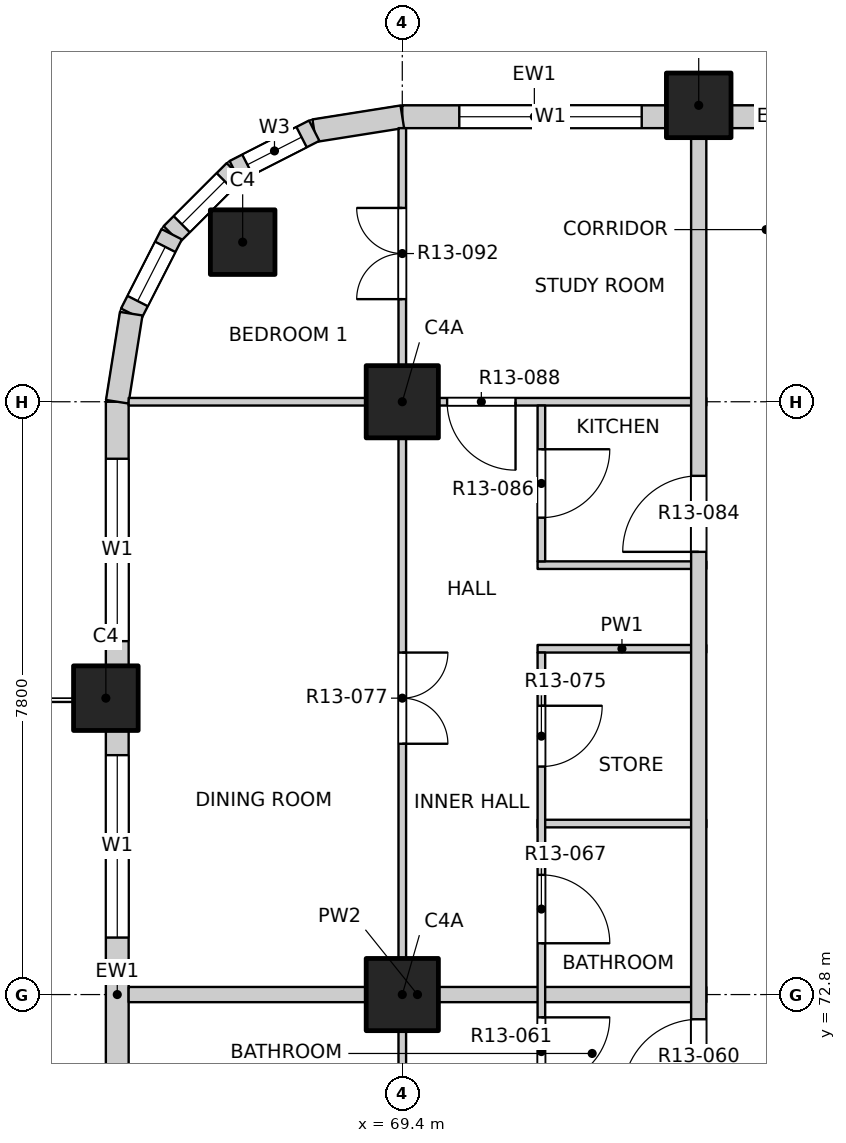
"""IFC4 building model, lengths in metres.
Left out: names, types, materials, properties, quantities, classifications, styles, units other than length and angle.
Written with IfcOpenShell. Run it as: python <this file> out.ifc"""

import sys

from ifc_helpers import new_model, si_unit, direction, frame, frame_2d, origin, origin_2d, place, context, subcontext, project, spatial, rectangle, extrude, element, fill, save


model = new_model("IFC4")
c1 = context("Model", 3, precision=1e-05, world=origin(), true_north=direction((0.0, 1.0)))
c2 = subcontext(c1, "Body", "Model", "MODEL_VIEW")
j1 = project(units=[si_unit("LENGTHUNIT", "METRE"), si_unit("PLANEANGLEUNIT", "RADIAN")], contexts=[c1])
p1 = place(None, origin())
s1 = spatial("IfcSite", under=j1, at=p1, CompositionType="ELEMENT")
p2 = place(p1, origin())
s2 = spatial("IfcBuilding", under=s1, at=p2, CompositionType="ELEMENT")
p3 = place(p2, frame((0.0, 0.0, 140.7)))
s3 = spatial("IfcBuildingStorey", under=s2, at=p3, CompositionType="ELEMENT", Elevation=140.7)
for number, where, z_axis, x_axis in (
    (1, (67.3, 82.7, -0.25), (0.0, 0.0, 1.0), (1.0, 0.0, 0.0)),
    (2, (73.3, 84.5, -0.25), (0.0, 0.0, 1.0), (1.0, 0.0, 0.0)),
    (3, (65.5, 76.7, -0.25), (0.0, 0.0, 1.0), (1.0, 0.0, 0.0)),
):
    element("IfcColumn", number, at=place(p3, frame(where, z_axis=z_axis, x_axis=x_axis)), inside=s3, PredefinedType="COLUMN", context=c2, shape_type="SweptSolid", body=[
        extrude(rectangle(XDim=0.85, YDim=0.85, at=origin_2d()), origin(), (0.0, 0.0, 1.0), 3.35),
    ])
for number, where, z_axis, x_axis in (
    (4, (69.4, 72.8, -0.25), (0.0, 0.0, 1.0), (1.0, 0.0, 0.0)),
    (5, (69.4, 80.6, -0.25), (0.0, 0.0, 1.0), (1.0, 0.0, 0.0)),
):
    element("IfcColumn", number, at=place(p3, frame(where, z_axis=z_axis, x_axis=x_axis)), inside=s3, PredefinedType="COLUMN", context=c2, shape_type="SweptSolid", body=[
        extrude(rectangle(XDim=0.95, YDim=0.95, at=origin_2d()), origin(), (0.0, 0.0, 1.0), 3.35),
    ])
p4 = place(p3, frame((69.4, 84.35, 0.0), z_axis=(0.0, 0.0, 1.0), x_axis=(1.0, 0.0, 0.0)))
e6 = element("IfcWall", 6, at=p4, inside=s3, PredefinedType="SOLIDWALL", context=c2, shape_type="SweptSolid", body=[
    extrude(rectangle(XDim=3.475, YDim=0.3, at=frame_2d((1.738, 0.0))), origin(), (0.0, 0.0, 1.0), 3.1),
])
p5 = place(p4, frame((0.75, 0.0, 0.9)))
e7 = element("IfcOpeningElement", 7, at=p5, cuts=e6, PredefinedType="OPENING", context=c2, shape_type="SweptSolid", body=[
    extrude(rectangle(XDim=2.4, YDim=1.8, at=frame_2d((1.2, 0.9))), frame((0.0, 0.16, 0.0), z_axis=(0.0, -1.0, 0.0), x_axis=(1.0, 0.0, 0.0)), (0.0, 0.0, 1.0), 0.32),
])
p6 = place(p3, frame((73.725, 84.35, 0.0), z_axis=(0.0, 0.0, 1.0), x_axis=(1.0, 0.0, 0.0)))
e8 = element("IfcWall", 8, at=p6, inside=s3, PredefinedType="SOLIDWALL", context=c2, shape_type="SweptSolid", body=[
    extrude(rectangle(XDim=1.25, YDim=0.3, at=frame_2d((0.625, 0.0))), origin(), (0.0, 0.0, 1.0), 3.1),
])
p7 = place(p3, frame((65.65, 69.325, 0.0), z_axis=(0.0, 0.0, 1.0), x_axis=(0.0, 1.0, 0.0)))
e9 = element("IfcWall", 9, at=p7, inside=s3, PredefinedType="SOLIDWALL", context=c2, shape_type="SweptSolid", body=[
    extrude(rectangle(XDim=6.95, YDim=0.3, at=frame_2d((3.475, 0.0))), origin(), (0.0, 0.0, 1.0), 3.1),
])
p8 = place(p7, frame((0.625, 0.0, 0.0)))
e10 = element("IfcOpeningElement", 10, at=p8, cuts=e9, PredefinedType="OPENING", context=c2, shape_type="SweptSolid", body=[
    extrude(rectangle(XDim=1.8, YDim=2.4, at=frame_2d((0.9, 1.2))), frame((0.0, 0.16, 0.0), z_axis=(0.0, -1.0, 0.0), x_axis=(1.0, 0.0, 0.0)), (0.0, 0.0, 1.0), 0.32),
])
p9 = place(p7, frame((4.225, 0.0, 0.9)))
e11 = element("IfcOpeningElement", 11, at=p9, cuts=e9, PredefinedType="OPENING", context=c2, shape_type="SweptSolid", body=[
    extrude(rectangle(XDim=2.4, YDim=1.8, at=frame_2d((1.2, 0.9))), frame((0.0, 0.16, 0.0), z_axis=(0.0, -1.0, 0.0), x_axis=(1.0, 0.0, 0.0)), (0.0, 0.0, 1.0), 0.32),
])
p10 = place(p3, frame((65.65, 77.125, 0.0), z_axis=(0.0, 0.0, 1.0), x_axis=(0.0, 1.0, 0.0)))
e12 = element("IfcWall", 12, at=p10, inside=s3, PredefinedType="SOLIDWALL", context=c2, shape_type="SweptSolid", body=[
    extrude(rectangle(XDim=3.475, YDim=0.3, at=frame_2d((1.738, 0.0))), origin(), (0.0, 0.0, 1.0), 3.1),
])
p11 = place(p10, frame((0.325, 0.0, 0.9)))
e13 = element("IfcOpeningElement", 13, at=p11, cuts=e12, PredefinedType="OPENING", context=c2, shape_type="SweptSolid", body=[
    extrude(rectangle(XDim=2.4, YDim=1.8, at=frame_2d((1.2, 0.9))), frame((0.0, 0.16, 0.0), z_axis=(0.0, -1.0, 0.0), x_axis=(1.0, 0.0, 0.0)), (0.0, 0.0, 1.0), 0.32),
])
p12 = place(p3, frame((69.4, 84.35, 0.0), z_axis=(0.0, 0.0, 1.0), x_axis=(-0.987678452879, -0.156496880861, 0.0)))
e14 = element("IfcWall", 14, at=p12, inside=s3, PredefinedType="SOLIDWALL", context=c2, shape_type="SweptSolid", body=[
    extrude(rectangle(XDim=1.173, YDim=0.3, at=frame_2d((0.586, 0.0))), origin(), (0.0, 0.0, 1.0), 3.1),
])
p13 = place(p3, frame((68.241, 84.167, 0.0), z_axis=(0.0, 0.0, 1.0), x_axis=(-0.890988677504, -0.454025524128, 0.0)))
e15 = element("IfcWall", 15, at=p13, inside=s3, PredefinedType="SOLIDWALL", context=c2, shape_type="SweptSolid", body=[
    extrude(rectangle(XDim=1.173, YDim=0.3, at=frame_2d((0.587, 0.0))), origin(), (0.0, 0.0, 1.0), 3.1),
])
p14 = place(p13, frame((0.187, 0.0, 0.9)))
e16 = element("IfcOpeningElement", 16, at=p14, cuts=e15, PredefinedType="OPENING", context=c2, shape_type="SweptSolid", body=[
    extrude(rectangle(XDim=0.8, YDim=1.2, at=frame_2d((0.4, 0.6))), frame((0.0, 0.16, 0.0), z_axis=(0.0, -1.0, 0.0), x_axis=(1.0, 0.0, 0.0)), (0.0, 0.0, 1.0), 0.32),
])
p15 = place(p3, frame((67.196, 83.634, 0.0), z_axis=(0.0, 0.0, 1.0), x_axis=(-0.707106781187, -0.707106781187, 0.0)))
e17 = element("IfcWall", 17, at=p15, inside=s3, PredefinedType="SOLIDWALL", context=c2, shape_type="SweptSolid", body=[
    extrude(rectangle(XDim=1.173, YDim=0.3, at=frame_2d((0.586, 0.0))), origin(), (0.0, 0.0, 1.0), 3.1),
])
p16 = place(p15, frame((0.187, 0.0, 0.9)))
e18 = element("IfcOpeningElement", 18, at=p16, cuts=e17, PredefinedType="OPENING", context=c2, shape_type="SweptSolid", body=[
    extrude(rectangle(XDim=0.8, YDim=1.2, at=frame_2d((0.4, 0.6))), frame((0.0, 0.16, 0.0), z_axis=(0.0, -1.0, 0.0), x_axis=(1.0, 0.0, 0.0)), (0.0, 0.0, 1.0), 0.32),
])
p17 = place(p3, frame((66.366, 82.804, 0.0), z_axis=(0.0, 0.0, 1.0), x_axis=(-0.454025524128, -0.890988677504, 0.0)))
e19 = element("IfcWall", 19, at=p17, inside=s3, PredefinedType="SOLIDWALL", context=c2, shape_type="SweptSolid", body=[
    extrude(rectangle(XDim=1.173, YDim=0.3, at=frame_2d((0.587, 0.0))), origin(), (0.0, 0.0, 1.0), 3.1),
])
p18 = place(p17, frame((0.187, 0.0, 0.9)))
e20 = element("IfcOpeningElement", 20, at=p18, cuts=e19, PredefinedType="OPENING", context=c2, shape_type="SweptSolid", body=[
    extrude(rectangle(XDim=0.8, YDim=1.2, at=frame_2d((0.4, 0.6))), frame((0.0, 0.16, 0.0), z_axis=(0.0, -1.0, 0.0), x_axis=(1.0, 0.0, 0.0)), (0.0, 0.0, 1.0), 0.32),
])
p19 = place(p3, frame((65.833, 81.759, 0.0), z_axis=(0.0, 0.0, 1.0), x_axis=(-0.156496880861, -0.987678452879, 0.0)))
e21 = element("IfcWall", 21, at=p19, inside=s3, PredefinedType="SOLIDWALL", context=c2, shape_type="SweptSolid", body=[
    extrude(rectangle(XDim=1.173, YDim=0.3, at=frame_2d((0.586, 0.0))), origin(), (0.0, 0.0, 1.0), 3.1),
])
p20 = place(p3, frame((65.8, 72.8, 0.0), z_axis=(0.0, 0.0, 1.0), x_axis=(1.0, 0.0, 0.0)))
e22 = element("IfcWall", 22, at=p20, inside=s3, PredefinedType="PARTITIONING", context=c2, shape_type="SweptSolid", body=[
    extrude(rectangle(XDim=7.6, YDim=0.2, at=frame_2d((3.8, 0.0))), origin(), (0.0, 0.0, 1.0), 3.1),
])
for number, where, z_axis, x_axis in (
    (23, (71.18, 75.05, 0.0), (0.0, 0.0, 1.0), (1.0, 0.0, 0.0)),
    (24, (71.18, 77.35, 0.0), (0.0, 0.0, 1.0), (1.0, 0.0, 0.0)),
    (25, (71.18, 78.45, 0.0), (0.0, 0.0, 1.0), (1.0, 0.0, 0.0)),
):
    element("IfcWall", number, at=place(p3, frame(where, z_axis=z_axis, x_axis=x_axis)), inside=s3, PredefinedType="PARTITIONING", context=c2, shape_type="SweptSolid", body=[
        extrude(rectangle(XDim=2.22, YDim=0.1, at=frame_2d((1.11, 0.0))), origin(), (0.0, 0.0, 1.0), 3.1),
    ])
p21 = place(p3, frame((65.8, 80.6, 0.0), z_axis=(0.0, 0.0, 1.0), x_axis=(1.0, 0.0, 0.0)))
e26 = element("IfcWall", 26, at=p21, inside=s3, PredefinedType="PARTITIONING", context=c2, shape_type="SweptSolid", body=[
    extrude(rectangle(XDim=7.6, YDim=0.1, at=frame_2d((3.8, 0.0))), origin(), (0.0, 0.0, 1.0), 3.1),
])
p22 = place(p21, frame((4.19, 0.0, 0.0)))
e27 = element("IfcOpeningElement", 27, at=p22, cuts=e26, PredefinedType="OPENING", context=c2, shape_type="SweptSolid", body=[
    extrude(rectangle(XDim=0.9, YDim=2.1, at=frame_2d((0.45, 1.05))), frame((0.0, 0.06, 0.0), z_axis=(0.0, -1.0, 0.0), x_axis=(1.0, 0.0, 0.0)), (0.0, 0.0, 1.0), 0.12),
])
p23 = place(p3, frame((69.4, 45.8, 0.0), z_axis=(0.0, 0.0, 1.0), x_axis=(0.0, 1.0, 0.0)))
e28 = element("IfcWall", 28, at=p23, inside=s3, PredefinedType="PARTITIONING", context=c2, shape_type="SweptSolid", body=[
    extrude(rectangle(XDim=38.4, YDim=0.1, at=frame_2d((19.2, 0.0))), origin(), (0.0, 0.0, 1.0), 3.1),
])
p24 = place(p23, frame((1.05, 0.0, 0.0)))
e29 = element("IfcOpeningElement", 29, at=p24, cuts=e28, PredefinedType="OPENING", context=c2, shape_type="SweptSolid", body=[
    extrude(rectangle(XDim=1.2, YDim=2.1, at=frame_2d((0.6, 1.05))), frame((0.0, 0.06, 0.0), z_axis=(0.0, -1.0, 0.0), x_axis=(1.0, 0.0, 0.0)), (0.0, 0.0, 1.0), 0.12),
])
p25 = place(p23, frame((5.1, 0.0, 0.0)))
e30 = element("IfcOpeningElement", 30, at=p25, cuts=e28, PredefinedType="OPENING", context=c2, shape_type="SweptSolid", body=[
    extrude(rectangle(XDim=0.9, YDim=2.1, at=frame_2d((0.45, 1.05))), frame((0.0, 0.06, 0.0), z_axis=(0.0, -1.0, 0.0), x_axis=(1.0, 0.0, 0.0)), (0.0, 0.0, 1.0), 0.12),
])
p26 = place(p23, frame((9.0, 0.0, 0.0)))
e31 = element("IfcOpeningElement", 31, at=p26, cuts=e28, PredefinedType="OPENING", context=c2, shape_type="SweptSolid", body=[
    extrude(rectangle(XDim=0.9, YDim=2.1, at=frame_2d((0.45, 1.05))), frame((0.0, 0.06, 0.0), z_axis=(0.0, -1.0, 0.0), x_axis=(1.0, 0.0, 0.0)), (0.0, 0.0, 1.0), 0.12),
])
p27 = place(p23, frame((12.9, 0.0, 0.0)))
e32 = element("IfcOpeningElement", 32, at=p27, cuts=e28, PredefinedType="OPENING", context=c2, shape_type="SweptSolid", body=[
    extrude(rectangle(XDim=0.9, YDim=2.1, at=frame_2d((0.45, 1.05))), frame((0.0, 0.06, 0.0), z_axis=(0.0, -1.0, 0.0), x_axis=(1.0, 0.0, 0.0)), (0.0, 0.0, 1.0), 0.12),
])
p28 = place(p23, frame((16.8, 0.0, 0.0)))
e33 = element("IfcOpeningElement", 33, at=p28, cuts=e28, PredefinedType="OPENING", context=c2, shape_type="SweptSolid", body=[
    extrude(rectangle(XDim=0.9, YDim=2.1, at=frame_2d((0.45, 1.05))), frame((0.0, 0.06, 0.0), z_axis=(0.0, -1.0, 0.0), x_axis=(1.0, 0.0, 0.0)), (0.0, 0.0, 1.0), 0.12),
])
p29 = place(p23, frame((20.7, 0.0, 0.0)))
e34 = element("IfcOpeningElement", 34, at=p29, cuts=e28, PredefinedType="OPENING", context=c2, shape_type="SweptSolid", body=[
    extrude(rectangle(XDim=0.9, YDim=2.1, at=frame_2d((0.45, 1.05))), frame((0.0, 0.06, 0.0), z_axis=(0.0, -1.0, 0.0), x_axis=(1.0, 0.0, 0.0)), (0.0, 0.0, 1.0), 0.12),
])
p30 = place(p23, frame((24.6, 0.0, 0.0)))
e35 = element("IfcOpeningElement", 35, at=p30, cuts=e28, PredefinedType="OPENING", context=c2, shape_type="SweptSolid", body=[
    extrude(rectangle(XDim=0.9, YDim=2.1, at=frame_2d((0.45, 1.05))), frame((0.0, 0.06, 0.0), z_axis=(0.0, -1.0, 0.0), x_axis=(1.0, 0.0, 0.0)), (0.0, 0.0, 1.0), 0.12),
])
p31 = place(p23, frame((30.3, 0.0, 0.0)))
e36 = element("IfcOpeningElement", 36, at=p31, cuts=e28, PredefinedType="OPENING", context=c2, shape_type="SweptSolid", body=[
    extrude(rectangle(XDim=1.2, YDim=2.1, at=frame_2d((0.6, 1.05))), frame((0.0, 0.06, 0.0), z_axis=(0.0, -1.0, 0.0), x_axis=(1.0, 0.0, 0.0)), (0.0, 0.0, 1.0), 0.12),
])
p32 = place(p23, frame((36.15, 0.0, 0.0)))
e37 = element("IfcOpeningElement", 37, at=p32, cuts=e28, PredefinedType="OPENING", context=c2, shape_type="SweptSolid", body=[
    extrude(rectangle(XDim=1.2, YDim=2.1, at=frame_2d((0.6, 1.05))), frame((0.0, 0.06, 0.0), z_axis=(0.0, -1.0, 0.0), x_axis=(1.0, 0.0, 0.0)), (0.0, 0.0, 1.0), 0.12),
])
p33 = place(p3, frame((71.23, 71.35, 0.0), z_axis=(0.0, 0.0, 1.0), x_axis=(0.0, 1.0, 0.0)))
e38 = element("IfcWall", 38, at=p33, inside=s3, PredefinedType="PARTITIONING", context=c2, shape_type="SweptSolid", body=[
    extrude(rectangle(XDim=5.95, YDim=0.1, at=frame_2d((2.975, 0.0))), origin(), (0.0, 0.0, 1.0), 3.1),
])
p34 = place(p33, frame((0.25, 0.0, 0.0)))
e39 = element("IfcOpeningElement", 39, at=p34, cuts=e38, PredefinedType="OPENING", context=c2, shape_type="SweptSolid", body=[
    extrude(rectangle(XDim=0.9, YDim=2.1, at=frame_2d((0.45, 1.05))), frame((0.0, 0.06, 0.0), z_axis=(0.0, -1.0, 0.0), x_axis=(1.0, 0.0, 0.0)), (0.0, 0.0, 1.0), 0.12),
])
p35 = place(p33, frame((2.125, 0.0, 0.0)))
e40 = element("IfcOpeningElement", 40, at=p35, cuts=e38, PredefinedType="OPENING", context=c2, shape_type="SweptSolid", body=[
    extrude(rectangle(XDim=0.9, YDim=2.1, at=frame_2d((0.45, 1.05))), frame((0.0, 0.06, 0.0), z_axis=(0.0, -1.0, 0.0), x_axis=(1.0, 0.0, 0.0)), (0.0, 0.0, 1.0), 0.12),
])
p36 = place(p33, frame((4.45, 0.0, 0.0)))
e41 = element("IfcOpeningElement", 41, at=p36, cuts=e38, PredefinedType="OPENING", context=c2, shape_type="SweptSolid", body=[
    extrude(rectangle(XDim=0.8, YDim=2.1, at=frame_2d((0.4, 1.05))), frame((0.0, 0.06, 0.0), z_axis=(0.0, -1.0, 0.0), x_axis=(1.0, 0.0, 0.0)), (0.0, 0.0, 1.0), 0.12),
])
p37 = place(p3, frame((71.23, 78.5, 0.0), z_axis=(0.0, 0.0, 1.0), x_axis=(0.0, 1.0, 0.0)))
e42 = element("IfcWall", 42, at=p37, inside=s3, PredefinedType="PARTITIONING", context=c2, shape_type="SweptSolid", body=[
    extrude(rectangle(XDim=2.05, YDim=0.1, at=frame_2d((1.025, 0.0))), origin(), (0.0, 0.0, 1.0), 3.1),
])
p38 = place(p37, frame((0.575, 0.0, 0.0)))
e43 = element("IfcOpeningElement", 43, at=p38, cuts=e42, PredefinedType="OPENING", context=c2, shape_type="SweptSolid", body=[
    extrude(rectangle(XDim=0.9, YDim=2.1, at=frame_2d((0.45, 1.05))), frame((0.0, 0.06, 0.0), z_axis=(0.0, -1.0, 0.0), x_axis=(1.0, 0.0, 0.0)), (0.0, 0.0, 1.0), 0.12),
])
p39 = place(p3, frame((73.3, 49.5, 0.0), z_axis=(0.0, 0.0, 1.0), x_axis=(0.0, 1.0, 0.0)))
e44 = element("IfcWall", 44, at=p39, inside=s3, PredefinedType="PARTITIONING", context=c2, shape_type="SweptSolid", body=[
    extrude(rectangle(XDim=34.7, YDim=0.2, at=frame_2d((17.35, 0.0))), origin(), (0.0, 0.0, 1.0), 3.1),
])
p40 = place(p39, frame((3.575, 0.0, 0.0)))
e45 = element("IfcOpeningElement", 45, at=p40, cuts=e44, PredefinedType="OPENING", context=c2, shape_type="SweptSolid", body=[
    extrude(rectangle(XDim=1.0, YDim=2.1, at=frame_2d((0.5, 1.05))), frame((0.0, 0.11, 0.0), z_axis=(0.0, -1.0, 0.0), x_axis=(1.0, 0.0, 0.0)), (0.0, 0.0, 1.0), 0.22),
])
p41 = place(p39, frame((21.975, 0.0, 0.0)))
e46 = element("IfcOpeningElement", 46, at=p41, cuts=e44, PredefinedType="OPENING", context=c2, shape_type="SweptSolid", body=[
    extrude(rectangle(XDim=1.0, YDim=2.1, at=frame_2d((0.5, 1.05))), frame((0.0, 0.11, 0.0), z_axis=(0.0, -1.0, 0.0), x_axis=(1.0, 0.0, 0.0)), (0.0, 0.0, 1.0), 0.22),
])
p42 = place(p39, frame((29.125, 0.0, 0.0)))
e47 = element("IfcOpeningElement", 47, at=p42, cuts=e44, PredefinedType="OPENING", context=c2, shape_type="SweptSolid", body=[
    extrude(rectangle(XDim=1.0, YDim=2.1, at=frame_2d((0.5, 1.05))), frame((0.0, 0.11, 0.0), z_axis=(0.0, -1.0, 0.0), x_axis=(1.0, 0.0, 0.0)), (0.0, 0.0, 1.0), 0.22),
])
p43 = place(p5, origin())
e48 = element("IfcWindow", 48, at=p43, inside=s3, PartitioningType="DOUBLE_PANEL_VERTICAL", PredefinedType="WINDOW", context=c2, shape_type="SweptSolid", body=[
    extrude(rectangle(XDim=2.4, YDim=1.8, at=frame_2d((1.2, 0.9))), frame((0.0, 0.03, 0.0), z_axis=(0.0, -1.0, 0.0), x_axis=(1.0, 0.0, 0.0)), (0.0, 0.0, 1.0), 0.06),
])
fill(e7, e48)
p44 = place(p9, origin())
e49 = element("IfcWindow", 49, at=p44, inside=s3, PartitioningType="DOUBLE_PANEL_VERTICAL", PredefinedType="WINDOW", context=c2, shape_type="SweptSolid", body=[
    extrude(rectangle(XDim=2.4, YDim=1.8, at=frame_2d((1.2, 0.9))), frame((0.0, 0.03, 0.0), z_axis=(0.0, -1.0, 0.0), x_axis=(1.0, 0.0, 0.0)), (0.0, 0.0, 1.0), 0.06),
])
fill(e11, e49)
p45 = place(p11, origin())
e50 = element("IfcWindow", 50, at=p45, inside=s3, PartitioningType="DOUBLE_PANEL_VERTICAL", PredefinedType="WINDOW", context=c2, shape_type="SweptSolid", body=[
    extrude(rectangle(XDim=2.4, YDim=1.8, at=frame_2d((1.2, 0.9))), frame((0.0, 0.03, 0.0), z_axis=(0.0, -1.0, 0.0), x_axis=(1.0, 0.0, 0.0)), (0.0, 0.0, 1.0), 0.06),
])
fill(e13, e50)
p46 = place(p14, origin())
e51 = element("IfcWindow", 51, at=p46, inside=s3, PartitioningType="SINGLE_PANEL", PredefinedType="WINDOW", context=c2, shape_type="SweptSolid", body=[
    extrude(rectangle(XDim=0.8, YDim=1.2, at=frame_2d((0.4, 0.6))), frame((0.0, 0.03, 0.0), z_axis=(0.0, -1.0, 0.0), x_axis=(1.0, 0.0, 0.0)), (0.0, 0.0, 1.0), 0.06),
])
fill(e16, e51)
p47 = place(p16, origin())
e52 = element("IfcWindow", 52, at=p47, inside=s3, PartitioningType="SINGLE_PANEL", PredefinedType="WINDOW", context=c2, shape_type="SweptSolid", body=[
    extrude(rectangle(XDim=0.8, YDim=1.2, at=frame_2d((0.4, 0.6))), frame((0.0, 0.03, 0.0), z_axis=(0.0, -1.0, 0.0), x_axis=(1.0, 0.0, 0.0)), (0.0, 0.0, 1.0), 0.06),
])
fill(e18, e52)
p48 = place(p18, origin())
e53 = element("IfcWindow", 53, at=p48, inside=s3, PartitioningType="SINGLE_PANEL", PredefinedType="WINDOW", context=c2, shape_type="SweptSolid", body=[
    extrude(rectangle(XDim=0.8, YDim=1.2, at=frame_2d((0.4, 0.6))), frame((0.0, 0.03, 0.0), z_axis=(0.0, -1.0, 0.0), x_axis=(1.0, 0.0, 0.0)), (0.0, 0.0, 1.0), 0.06),
])
fill(e20, e53)
p49 = place(p41, origin())
e54 = element("IfcDoor", 54, at=p49, inside=s3, OperationType="SINGLE_SWING_RIGHT", PredefinedType="DOOR", context=c2, shape_type="SweptSolid", body=[
    extrude(rectangle(XDim=1.0, YDim=2.1, at=frame_2d((0.5, 1.05))), frame((0.0, 0.025, 0.0), z_axis=(0.0, -1.0, 0.0), x_axis=(1.0, 0.0, 0.0)), (0.0, 0.0, 1.0), 0.05),
])
fill(e46, e54)
p50 = place(p34, origin())
e55 = element("IfcDoor", 55, at=p50, inside=s3, OperationType="SINGLE_SWING_LEFT", PredefinedType="DOOR", context=c2, shape_type="SweptSolid", body=[
    extrude(rectangle(XDim=0.9, YDim=2.1, at=frame_2d((0.45, 1.05))), frame((0.0, 0.025, 0.0), z_axis=(0.0, -1.0, 0.0), x_axis=(1.0, 0.0, 0.0)), (0.0, 0.0, 1.0), 0.05),
])
fill(e39, e55)
p51 = place(p35, origin())
e56 = element("IfcDoor", 56, at=p51, inside=s3, OperationType="SINGLE_SWING_RIGHT", PredefinedType="DOOR", context=c2, shape_type="SweptSolid", body=[
    extrude(rectangle(XDim=0.9, YDim=2.1, at=frame_2d((0.45, 1.05))), frame((0.0, 0.025, 0.0), z_axis=(0.0, -1.0, 0.0), x_axis=(1.0, 0.0, 0.0)), (0.0, 0.0, 1.0), 0.05),
])
fill(e40, e56)
p52 = place(p36, origin())
e57 = element("IfcDoor", 57, at=p52, inside=s3, OperationType="SINGLE_SWING_LEFT", PredefinedType="DOOR", context=c2, shape_type="SweptSolid", body=[
    extrude(rectangle(XDim=0.8, YDim=2.1, at=frame_2d((0.4, 1.05))), frame((0.0, 0.025, 0.0), z_axis=(0.0, -1.0, 0.0), x_axis=(1.0, 0.0, 0.0)), (0.0, 0.0, 1.0), 0.05),
])
fill(e41, e57)
p53 = place(p31, origin())
e58 = element("IfcDoor", 58, at=p53, inside=s3, OperationType="DOUBLE_DOOR_SINGLE_SWING", PredefinedType="DOOR", context=c2, shape_type="SweptSolid", body=[
    extrude(rectangle(XDim=1.2, YDim=2.1, at=frame_2d((0.6, 1.05))), frame((0.0, 0.025, 0.0), z_axis=(0.0, -1.0, 0.0), x_axis=(1.0, 0.0, 0.0)), (0.0, 0.0, 1.0), 0.05),
])
fill(e36, e58)
p54 = place(p42, origin())
e59 = element("IfcDoor", 59, at=p54, inside=s3, OperationType="SINGLE_SWING_RIGHT", PredefinedType="DOOR", context=c2, shape_type="SweptSolid", body=[
    extrude(rectangle(XDim=1.0, YDim=2.1, at=frame_2d((0.5, 1.05))), frame((0.0, 0.025, 0.0), z_axis=(0.0, -1.0, 0.0), x_axis=(1.0, 0.0, 0.0)), (0.0, 0.0, 1.0), 0.05),
])
fill(e47, e59)
p55 = place(p38, origin())
e60 = element("IfcDoor", 60, at=p55, inside=s3, OperationType="SINGLE_SWING_LEFT", PredefinedType="DOOR", context=c2, shape_type="SweptSolid", body=[
    extrude(rectangle(XDim=0.9, YDim=2.1, at=frame_2d((0.45, 1.05))), frame((0.0, 0.025, 0.0), z_axis=(0.0, -1.0, 0.0), x_axis=(1.0, 0.0, 0.0)), (0.0, 0.0, 1.0), 0.05),
])
fill(e43, e60)
p56 = place(p22, origin())
e61 = element("IfcDoor", 61, at=p56, inside=s3, OperationType="SINGLE_SWING_LEFT", PredefinedType="DOOR", context=c2, shape_type="SweptSolid", body=[
    extrude(rectangle(XDim=0.9, YDim=2.1, at=frame_2d((0.45, 1.05))), frame((0.0, 0.025, 0.0), z_axis=(0.0, -1.0, 0.0), x_axis=(1.0, 0.0, 0.0)), (0.0, 0.0, 1.0), 0.05),
])
fill(e27, e61)
p57 = place(p32, origin())
e62 = element("IfcDoor", 62, at=p57, inside=s3, OperationType="DOUBLE_DOOR_SINGLE_SWING", PredefinedType="DOOR", context=c2, shape_type="SweptSolid", body=[
    extrude(rectangle(XDim=1.2, YDim=2.1, at=frame_2d((0.6, 1.05))), frame((0.0, 0.025, 0.0), z_axis=(0.0, -1.0, 0.0), x_axis=(1.0, 0.0, 0.0)), (0.0, 0.0, 1.0), 0.05),
])
fill(e37, e62)
save(model, sys.argv[1])
